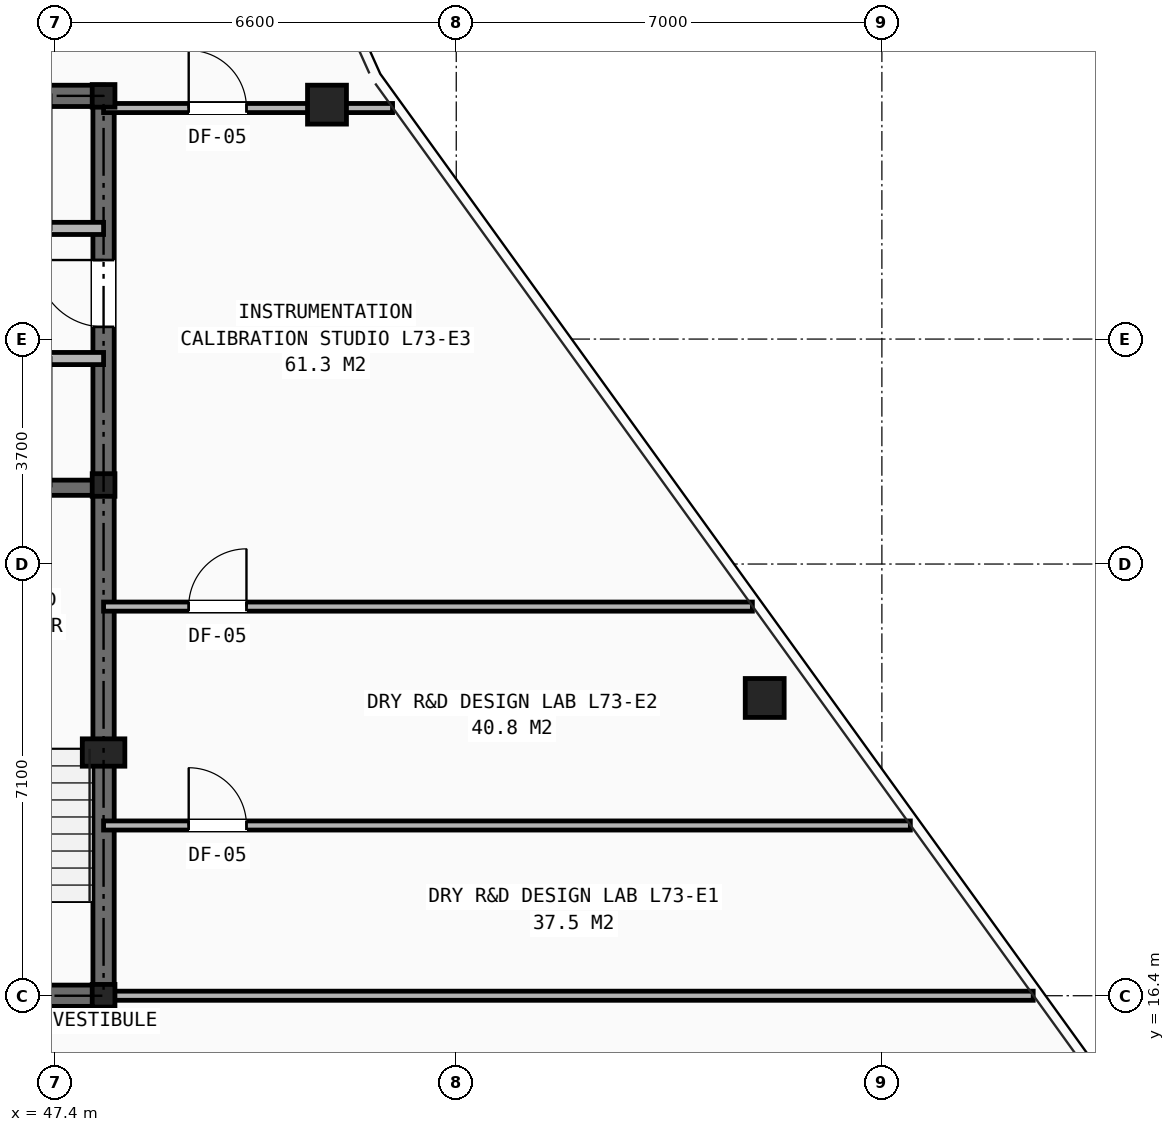
"""IFC4 building model, lengths in metres.
Left out: names, types, materials, properties, quantities, classifications, styles, units other than length and angle.
Written with IfcOpenShell. Run it as: python <this file> out.ifc"""

import sys

from ifc_helpers import new_model, si_unit, direction, frame, frame_2d, origin, origin_2d, place, context, subcontext, project, spatial, rectangle, hollow_rectangle, i_section, extrude, element, fill, save


model = new_model("IFC4")
c1 = context("Model", 3, precision=1e-05, world=origin(), true_north=direction((0.0, 1.0)))
c2 = subcontext(c1, "Body", "Model", "MODEL_VIEW")
j1 = project(units=[si_unit("LENGTHUNIT", "METRE"), si_unit("PLANEANGLEUNIT", "RADIAN")], contexts=[c1])
p1 = place(None, origin())
s1 = spatial("IfcSite", under=j1, at=p1, CompositionType="ELEMENT")
p2 = place(p1, origin())
s2 = spatial("IfcBuilding", under=s1, at=p2, CompositionType="ELEMENT")
p3 = place(p2, frame((0.0, 0.0, 258.5)))
s3 = spatial("IfcBuildingStorey", under=s2, at=p3, CompositionType="ELEMENT", Elevation=258.5)
for number, where, z_axis, x_axis in (
    (1, (48.2, 16.4, 0.0), (0.0, 0.0, 1.0), (1.0, 0.0, 0.0)),
    (2, (48.2, 24.8, 0.0), (0.0, 0.0, 1.0), (1.0, 0.0, 0.0)),
    (3, (48.2, 31.2, 0.0), (0.0, 0.0, 1.0), (1.0, 0.0, 0.0)),
):
    element("IfcColumn", number, at=place(p3, frame(where, z_axis=z_axis, x_axis=x_axis)), inside=s3, PredefinedType="COLUMN", context=c2, shape_type="SweptSolid", body=[
        extrude(i_section(OverallWidth=0.374, OverallDepth=0.372, WebThickness=0.016, FlangeThickness=0.026, at=origin_2d()), origin(), (0.0, 0.0, 1.0), 3.5),
    ])
p4 = place(p3, frame((48.2, 20.4, 0.0), z_axis=(0.0, 0.0, 1.0), x_axis=(1.0, 0.0, 0.0)))
e4 = element("IfcColumn", 4, at=p4, inside=s3, PredefinedType="PILASTER", context=c2, shape_type="SweptSolid", body=[
    extrude(rectangle(XDim=0.7, YDim=0.45, at=origin_2d()), origin(), (0.0, 0.0, 1.0), 3.5),
])
for number, where, z_axis, x_axis in (
    (5, (59.073, 21.297, 0.0), (0.0, 0.0, 1.0), (1.0, 0.0, 0.0)),
    (6, (51.874, 31.056, 0.0), (0.0, 0.0, 1.0), (1.0, 0.0, 0.0)),
):
    element("IfcColumn", number, at=place(p3, frame(where, z_axis=z_axis, x_axis=x_axis)), inside=s3, PredefinedType="COLUMN", context=c2, shape_type="SweptSolid", body=[
        extrude(hollow_rectangle(XDim=0.64, YDim=0.64, WallThickness=0.045, at=origin_2d()), origin(), (0.0, 0.0, 1.0), 3.5),
    ])
p5 = place(p3, frame((31.8, 16.4, 0.0), z_axis=(0.0, 0.0, 1.0), x_axis=(1.0, 0.0, 0.0)))
e7 = element("IfcWall", 7, at=p5, inside=s3, PredefinedType="SHEAR", context=c2, shape_type="SweptSolid", body=[
    extrude(rectangle(XDim=16.4, YDim=0.35, at=frame_2d((8.2, 0.0))), origin(), (0.0, 0.0, 1.0), 3.25),
])
p6 = place(p5, frame((7.75, 0.0, 0.0)))
e8 = element("IfcOpeningElement", 8, at=p6, cuts=e7, PredefinedType="OPENING", context=c2, shape_type="SweptSolid", body=[
    extrude(rectangle(XDim=0.9, YDim=2.1, at=frame_2d((0.45, 1.05))), frame((0.0, 0.185, 0.0), z_axis=(0.0, -1.0, 0.0), x_axis=(1.0, 0.0, 0.0)), (0.0, 0.0, 1.0), 0.37),
])
p7 = place(p5, frame((4.2, 0.0, 0.0)))
e9 = element("IfcOpeningElement", 9, at=p7, cuts=e7, PredefinedType="OPENING", context=c2, shape_type="SweptSolid", body=[
    extrude(rectangle(XDim=0.95, YDim=2.1, at=frame_2d((0.475, 1.05))), frame((0.0, 0.185, 0.0), z_axis=(0.0, -1.0, 0.0), x_axis=(1.0, 0.0, 0.0)), (0.0, 0.0, 1.0), 0.37),
])
p8 = place(p5, frame((10.6, 0.0, 0.0)))
e10 = element("IfcOpeningElement", 10, at=p8, cuts=e7, PredefinedType="OPENING", context=c2, shape_type="SweptSolid", body=[
    extrude(rectangle(XDim=0.95, YDim=2.1, at=frame_2d((0.475, 1.05))), frame((0.0, 0.185, 0.0), z_axis=(0.0, -1.0, 0.0), x_axis=(1.0, 0.0, 0.0)), (0.0, 0.0, 1.0), 0.37),
])
p9 = place(p3, frame((31.8, 31.2, 0.0), z_axis=(0.0, 0.0, 1.0), x_axis=(1.0, 0.0, 0.0)))
e11 = element("IfcWall", 11, at=p9, inside=s3, PredefinedType="SHEAR", context=c2, shape_type="SweptSolid", body=[
    extrude(rectangle(XDim=16.4, YDim=0.35, at=frame_2d((8.2, 0.0))), origin(), (0.0, 0.0, 1.0), 3.25),
])
p10 = place(p3, frame((48.2, 16.4, 0.0), z_axis=(0.0, 0.0, 1.0), x_axis=(0.0, 1.0, 0.0)))
e12 = element("IfcWall", 12, at=p10, inside=s3, PredefinedType="SHEAR", context=c2, shape_type="SweptSolid", body=[
    extrude(rectangle(XDim=14.8, YDim=0.35, at=frame_2d((7.4, 0.0))), origin(), (0.0, 0.0, 1.0), 3.25),
])
p11 = place(p10, frame((11.0, 0.0, 0.0)))
e13 = element("IfcOpeningElement", 13, at=p11, cuts=e12, PredefinedType="OPENING", context=c2, shape_type="SweptSolid", body=[
    extrude(rectangle(XDim=1.1, YDim=2.15, at=frame_2d((0.55, 1.075))), frame((0.0, 0.185, 0.0), z_axis=(0.0, -1.0, 0.0), x_axis=(1.0, 0.0, 0.0)), (0.0, 0.0, 1.0), 0.37),
])
p12 = place(p3, frame((44.955, 24.755, 0.0), z_axis=(0.0, 0.0, 1.0), x_axis=(1.0, 0.0, 0.0)))
e14 = element("IfcWall", 14, at=p12, inside=s3, PredefinedType="SHEAR", context=c2, shape_type="SweptSolid", body=[
    extrude(rectangle(XDim=3.245, YDim=0.25, at=frame_2d((1.623, 0.0))), origin(), (0.0, 0.0, 1.0), 3.25),
])
p13 = place(p3, frame((31.8, 29.02, 0.0), z_axis=(0.0, 0.0, 1.0), x_axis=(1.0, 0.0, 0.0)))
e15 = element("IfcWall", 15, at=p13, inside=s3, PredefinedType="SOLIDWALL", context=c2, shape_type="SweptSolid", body=[
    extrude(rectangle(XDim=16.4, YDim=0.2, at=frame_2d((8.2, 0.0))), origin(), (0.0, 0.0, 1.0), 2.705),
])
p14 = place(p13, frame((0.55, 0.0, 0.0)))
e16 = element("IfcOpeningElement", 16, at=p14, cuts=e15, PredefinedType="OPENING", context=c2, shape_type="SweptSolid", body=[
    extrude(rectangle(XDim=0.85, YDim=2.05, at=frame_2d((0.425, 1.025))), frame((0.0, 0.11, 0.0), z_axis=(0.0, -1.0, 0.0), x_axis=(1.0, 0.0, 0.0)), (0.0, 0.0, 1.0), 0.22),
])
p15 = place(p13, frame((5.94, 0.0, 0.0)))
e17 = element("IfcOpeningElement", 17, at=p15, cuts=e15, PredefinedType="OPENING", context=c2, shape_type="SweptSolid", body=[
    extrude(rectangle(XDim=0.9, YDim=2.1, at=frame_2d((0.45, 1.05))), frame((0.0, 0.11, 0.0), z_axis=(0.0, -1.0, 0.0), x_axis=(1.0, 0.0, 0.0)), (0.0, 0.0, 1.0), 0.22),
])
p16 = place(p13, frame((11.41, 0.0, 0.0)))
e18 = element("IfcOpeningElement", 18, at=p16, cuts=e15, PredefinedType="OPENING", context=c2, shape_type="SweptSolid", body=[
    extrude(rectangle(XDim=1.1, YDim=2.15, at=frame_2d((0.55, 1.075))), frame((0.0, 0.11, 0.0), z_axis=(0.0, -1.0, 0.0), x_axis=(1.0, 0.0, 0.0)), (0.0, 0.0, 1.0), 0.22),
])
p17 = place(p13, frame((13.73, 0.0, 0.0)))
e19 = element("IfcOpeningElement", 19, at=p17, cuts=e15, PredefinedType="OPENING", context=c2, shape_type="SweptSolid", body=[
    extrude(rectangle(XDim=1.1, YDim=2.15, at=frame_2d((0.55, 1.075))), frame((0.0, 0.11, 0.0), z_axis=(0.0, -1.0, 0.0), x_axis=(1.0, 0.0, 0.0)), (0.0, 0.0, 1.0), 0.22),
])
p18 = place(p3, frame((31.8, 26.88, 0.0), z_axis=(0.0, 0.0, 1.0), x_axis=(1.0, 0.0, 0.0)))
e20 = element("IfcWall", 20, at=p18, inside=s3, PredefinedType="SOLIDWALL", context=c2, shape_type="SweptSolid", body=[
    extrude(rectangle(XDim=16.4, YDim=0.2, at=frame_2d((8.2, 0.0))), origin(), (0.0, 0.0, 1.0), 2.705),
])
p19 = place(p18, frame((0.55, 0.0, 0.0)))
e21 = element("IfcOpeningElement", 21, at=p19, cuts=e20, PredefinedType="OPENING", context=c2, shape_type="SweptSolid", body=[
    extrude(rectangle(XDim=0.85, YDim=2.05, at=frame_2d((0.425, 1.025))), frame((0.0, 0.11, 0.0), z_axis=(0.0, -1.0, 0.0), x_axis=(1.0, 0.0, 0.0)), (0.0, 0.0, 1.0), 0.22),
])
p20 = place(p18, frame((5.94, 0.0, 0.0)))
e22 = element("IfcOpeningElement", 22, at=p20, cuts=e20, PredefinedType="OPENING", context=c2, shape_type="SweptSolid", body=[
    extrude(rectangle(XDim=0.9, YDim=2.1, at=frame_2d((0.45, 1.05))), frame((0.0, 0.11, 0.0), z_axis=(0.0, -1.0, 0.0), x_axis=(1.0, 0.0, 0.0)), (0.0, 0.0, 1.0), 0.22),
])
p21 = place(p18, frame((11.41, 0.0, 0.0)))
e23 = element("IfcOpeningElement", 23, at=p21, cuts=e20, PredefinedType="OPENING", context=c2, shape_type="SweptSolid", body=[
    extrude(rectangle(XDim=1.1, YDim=2.15, at=frame_2d((0.55, 1.075))), frame((0.0, 0.11, 0.0), z_axis=(0.0, -1.0, 0.0), x_axis=(1.0, 0.0, 0.0)), (0.0, 0.0, 1.0), 0.22),
])
p22 = place(p18, frame((13.73, 0.0, 0.0)))
e24 = element("IfcOpeningElement", 24, at=p22, cuts=e20, PredefinedType="OPENING", context=c2, shape_type="SweptSolid", body=[
    extrude(rectangle(XDim=1.1, YDim=2.15, at=frame_2d((0.55, 1.075))), frame((0.0, 0.11, 0.0), z_axis=(0.0, -1.0, 0.0), x_axis=(1.0, 0.0, 0.0)), (0.0, 0.0, 1.0), 0.22),
])
p23 = place(p3, frame((48.2, 16.4, 0.0), z_axis=(0.0, 0.0, 1.0), x_axis=(1.0, 0.0, 0.0)))
e25 = element("IfcWall", 25, at=p23, inside=s3, PredefinedType="PARTITIONING", context=c2, shape_type="SweptSolid", body=[
    extrude(rectangle(XDim=15.289, YDim=0.15, at=frame_2d((7.644, 0.0))), origin(), (0.0, 0.0, 1.0), 2.292),
])
p24 = place(p3, frame((48.2, 19.2, 0.0), z_axis=(0.0, 0.0, 1.0), x_axis=(1.0, 0.0, 0.0)))
e26 = element("IfcWall", 26, at=p24, inside=s3, PredefinedType="PARTITIONING", context=c2, shape_type="SweptSolid", body=[
    extrude(rectangle(XDim=13.268, YDim=0.15, at=frame_2d((6.634, 0.0))), origin(), (0.0, 0.0, 1.0), 2.292),
])
p25 = place(p24, frame((1.4, 0.0, 0.0)))
e27 = element("IfcOpeningElement", 27, at=p25, cuts=e26, PredefinedType="OPENING", context=c2, shape_type="SweptSolid", body=[
    extrude(rectangle(XDim=0.95, YDim=2.1, at=frame_2d((0.475, 1.05))), frame((0.0, 0.085, 0.0), z_axis=(0.0, -1.0, 0.0), x_axis=(1.0, 0.0, 0.0)), (0.0, 0.0, 1.0), 0.17),
])
p26 = place(p3, frame((48.2, 22.8, 0.0), z_axis=(0.0, 0.0, 1.0), x_axis=(1.0, 0.0, 0.0)))
e28 = element("IfcWall", 28, at=p26, inside=s3, PredefinedType="PARTITIONING", context=c2, shape_type="SweptSolid", body=[
    extrude(rectangle(XDim=10.67, YDim=0.15, at=frame_2d((5.335, 0.0))), origin(), (0.0, 0.0, 1.0), 2.628),
])
p27 = place(p26, frame((1.4, 0.0, 0.0)))
e29 = element("IfcOpeningElement", 29, at=p27, cuts=e28, PredefinedType="OPENING", context=c2, shape_type="SweptSolid", body=[
    extrude(rectangle(XDim=0.95, YDim=2.1, at=frame_2d((0.475, 1.05))), frame((0.0, 0.085, 0.0), z_axis=(0.0, -1.0, 0.0), x_axis=(1.0, 0.0, 0.0)), (0.0, 0.0, 1.0), 0.17),
])
p28 = place(p3, frame((48.2, 31.0, 0.0), z_axis=(0.0, 0.0, 1.0), x_axis=(1.0, 0.0, 0.0)))
e30 = element("IfcWall", 30, at=p28, inside=s3, PredefinedType="PARTITIONING", context=c2, shape_type="SweptSolid", body=[
    extrude(rectangle(XDim=4.752, YDim=0.15, at=frame_2d((2.376, 0.0))), origin(), (0.0, 0.0, 1.0), 2.292),
])
p29 = place(p28, frame((1.4, 0.0, 0.0)))
e31 = element("IfcOpeningElement", 31, at=p29, cuts=e30, PredefinedType="OPENING", context=c2, shape_type="SweptSolid", body=[
    extrude(rectangle(XDim=0.95, YDim=2.1, at=frame_2d((0.475, 1.05))), frame((0.0, 0.085, 0.0), z_axis=(0.0, -1.0, 0.0), x_axis=(1.0, 0.0, 0.0)), (0.0, 0.0, 1.0), 0.17),
])
p30 = place(p11, origin())
e32 = element("IfcDoor", 32, at=p30, inside=s3, OperationType="SINGLE_SWING_RIGHT", PredefinedType="DOOR", context=c2, shape_type="SweptSolid", body=[
    extrude(rectangle(XDim=1.1, YDim=2.15, at=frame_2d((0.55, 1.075))), frame((0.0, 0.025, 0.0), z_axis=(0.0, -1.0, 0.0), x_axis=(1.0, 0.0, 0.0)), (0.0, 0.0, 1.0), 0.05),
])
fill(e13, e32)
p31 = place(p25, origin())
e33 = element("IfcDoor", 33, at=p31, inside=s3, OperationType="SINGLE_SWING_LEFT", PredefinedType="DOOR", context=c2, shape_type="SweptSolid", body=[
    extrude(rectangle(XDim=0.95, YDim=2.1, at=frame_2d((0.475, 1.05))), frame((0.0, 0.025, 0.0), z_axis=(0.0, -1.0, 0.0), x_axis=(1.0, 0.0, 0.0)), (0.0, 0.0, 1.0), 0.05),
])
fill(e27, e33)
p32 = place(p27, origin())
e34 = element("IfcDoor", 34, at=p32, inside=s3, OperationType="SINGLE_SWING_RIGHT", PredefinedType="DOOR", context=c2, shape_type="SweptSolid", body=[
    extrude(rectangle(XDim=0.95, YDim=2.1, at=frame_2d((0.475, 1.05))), frame((0.0, 0.025, 0.0), z_axis=(0.0, -1.0, 0.0), x_axis=(1.0, 0.0, 0.0)), (0.0, 0.0, 1.0), 0.05),
])
fill(e29, e34)
p33 = place(p29, origin())
e35 = element("IfcDoor", 35, at=p33, inside=s3, OperationType="SINGLE_SWING_LEFT", PredefinedType="DOOR", context=c2, shape_type="SweptSolid", body=[
    extrude(rectangle(XDim=0.95, YDim=2.1, at=frame_2d((0.475, 1.05))), frame((0.0, 0.025, 0.0), z_axis=(0.0, -1.0, 0.0), x_axis=(1.0, 0.0, 0.0)), (0.0, 0.0, 1.0), 0.05),
])
fill(e31, e35)
save(model, sys.argv[1])
